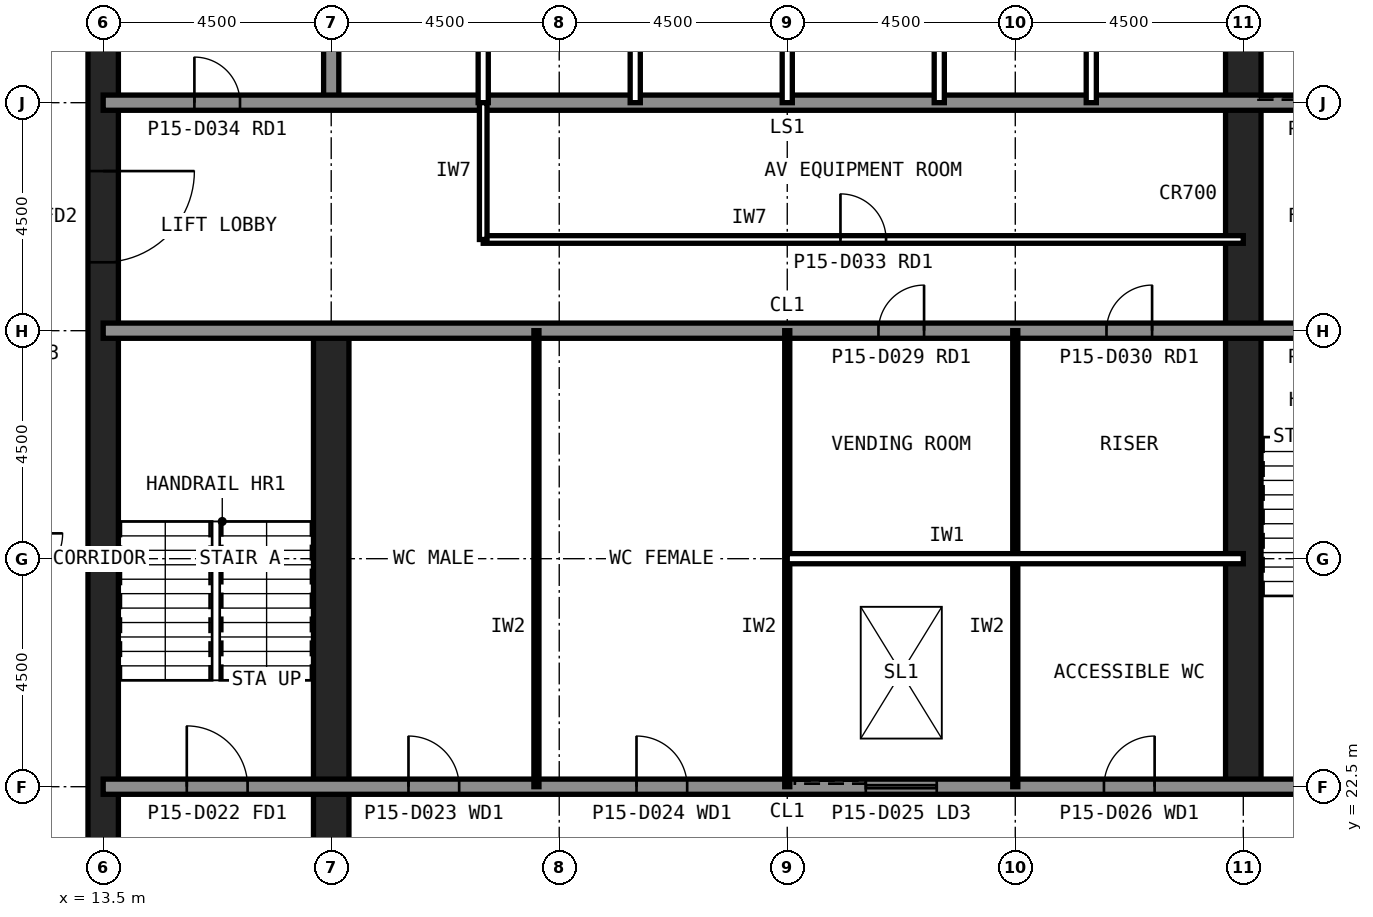
"""IFC4 building model, lengths in metres.
Left out: names, types, materials, properties, quantities, classifications, styles, units other than length and angle.
Written with IfcOpenShell. Run it as: python <this file> out.ifc"""

import sys

from ifc_helpers import new_model, si_unit, direction, frame, frame_2d, origin, place, context, subcontext, project, spatial, rectangle, extrude, element, fill, save


model = new_model("IFC4")
c1 = context("Model", 3, precision=1e-05, world=origin(), true_north=direction((0.0, 1.0)))
c2 = subcontext(c1, "Body", "Model", "MODEL_VIEW")
j1 = project(units=[si_unit("LENGTHUNIT", "METRE"), si_unit("PLANEANGLEUNIT", "RADIAN")], contexts=[c1])
p1 = place(None, origin())
s1 = spatial("IfcSite", under=j1, at=p1, CompositionType="ELEMENT")
p2 = place(p1, origin())
s2 = spatial("IfcBuilding", under=s1, at=p2, CompositionType="ELEMENT")
p3 = place(p2, frame((0.0, 0.0, 62.6)))
s3 = spatial("IfcBuildingStorey", under=s2, at=p3, CompositionType="ELEMENT", Elevation=62.6)
p4 = place(p3, frame((13.5, 40.5, 0.0), z_axis=(0.0, 0.0, 1.0), x_axis=(0.0, -1.0, 0.0)))
e1 = element("IfcWall", 1, at=p4, inside=s3, PredefinedType="SHEAR", context=c2, shape_type="SweptSolid", body=[
    extrude(rectangle(XDim=27.0, YDim=0.6, at=frame_2d((13.5, 0.0))), origin(), (0.0, 0.0, 1.0), 4.2),
])
p5 = place(p4, frame((19.65, 0.0, 0.0)))
e2 = element("IfcOpeningElement", 2, at=p5, cuts=e1, PredefinedType="OPENING", context=c2, shape_type="SweptSolid", body=[
    extrude(rectangle(XDim=1.2, YDim=2.1, at=frame_2d((0.6, 1.05))), frame((0.0, 0.31, 0.0), z_axis=(0.0, -1.0, 0.0), x_axis=(1.0, 0.0, 0.0)), (0.0, 0.0, 1.0), 0.62),
])
p6 = place(p4, frame((5.85, 0.0, 0.0)))
e3 = element("IfcOpeningElement", 3, at=p6, cuts=e1, PredefinedType="OPENING", context=c2, shape_type="SweptSolid", body=[
    extrude(rectangle(XDim=1.8, YDim=2.1, at=frame_2d((0.9, 1.05))), frame((0.0, 0.31, 0.0), z_axis=(0.0, -1.0, 0.0), x_axis=(1.0, 0.0, 0.0)), (0.0, 0.0, 1.0), 0.62),
])
p7 = place(p3, frame((18.0, 13.5, 0.0), z_axis=(0.0, 0.0, 1.0), x_axis=(0.0, 1.0, 0.0)))
e4 = element("IfcWall", 4, at=p7, inside=s3, PredefinedType="SHEAR", context=c2, shape_type="SweptSolid", body=[
    extrude(rectangle(XDim=18.0, YDim=0.7, at=frame_2d((9.0, 0.0))), origin(), (0.0, 0.0, 1.0), 4.2),
])
p8 = place(p3, frame((18.0, 36.0, 0.0), z_axis=(0.0, 0.0, 1.0), x_axis=(0.0, 1.0, 0.0)))
e5 = element("IfcWall", 5, at=p8, inside=s3, PredefinedType="SOLIDWALL", context=c2, shape_type="SweptSolid", body=[
    extrude(rectangle(XDim=4.5, YDim=0.3, at=frame_2d((2.25, 0.0))), origin(), (0.0, 0.0, 1.0), 4.04),
])
p9 = place(p3, frame((36.0, 22.5, 0.0), z_axis=(0.0, 0.0, 1.0), x_axis=(0.0, 1.0, 0.0)))
e6 = element("IfcWall", 6, at=p9, inside=s3, PredefinedType="SHEAR", context=c2, shape_type="SweptSolid", body=[
    extrude(rectangle(XDim=18.0, YDim=0.7, at=frame_2d((9.0, 0.0))), origin(), (0.0, 0.0, 1.0), 4.2),
])
p10 = place(p3, frame((13.5, 36.0, 0.0), z_axis=(0.0, 0.0, 1.0), x_axis=(1.0, 0.0, 0.0)))
e7 = element("IfcWall", 7, at=p10, inside=s3, PredefinedType="SOLIDWALL", context=c2, shape_type="SweptSolid", body=[
    extrude(rectangle(XDim=27.0, YDim=0.3, at=frame_2d((13.5, 0.0))), origin(), (0.0, 0.0, 1.0), 4.04),
])
p11 = place(p10, frame((1.8, 0.0, 0.0)))
e8 = element("IfcOpeningElement", 8, at=p11, cuts=e7, PredefinedType="OPENING", context=c2, shape_type="SweptSolid", body=[
    extrude(rectangle(XDim=0.9, YDim=2.1, at=frame_2d((0.45, 1.05))), frame((0.0, 0.16, 0.0), z_axis=(0.0, -1.0, 0.0), x_axis=(1.0, 0.0, 0.0)), (0.0, 0.0, 1.0), 0.32),
])
p12 = place(p10, frame((24.1, 0.0, 0.0)))
e9 = element("IfcOpeningElement", 9, at=p12, cuts=e7, PredefinedType="OPENING", context=c2, shape_type="SweptSolid", body=[
    extrude(rectangle(XDim=1.3, YDim=2.2, at=frame_2d((0.65, 1.1))), frame((0.0, 0.16, 0.0), z_axis=(0.0, -1.0, 0.0), x_axis=(1.0, 0.0, 0.0)), (0.0, 0.0, 1.0), 0.32),
])
p13 = place(p3, frame((13.5, 22.5, 0.0), z_axis=(0.0, 0.0, 1.0), x_axis=(1.0, 0.0, 0.0)))
e10 = element("IfcWall", 10, at=p13, inside=s3, PredefinedType="SOLIDWALL", context=c2, shape_type="SweptSolid", body=[
    extrude(rectangle(XDim=27.0, YDim=0.3, at=frame_2d((13.5, 0.0))), origin(), (0.0, 0.0, 1.0), 4.04),
])
p14 = place(p13, frame((1.65, 0.0, 0.0)))
e11 = element("IfcOpeningElement", 11, at=p14, cuts=e10, PredefinedType="OPENING", context=c2, shape_type="SweptSolid", body=[
    extrude(rectangle(XDim=1.2, YDim=2.1, at=frame_2d((0.6, 1.05))), frame((0.0, 0.16, 0.0), z_axis=(0.0, -1.0, 0.0), x_axis=(1.0, 0.0, 0.0)), (0.0, 0.0, 1.0), 0.32),
])
p15 = place(p13, frame((6.025, 0.0, 0.0)))
e12 = element("IfcOpeningElement", 12, at=p15, cuts=e10, PredefinedType="OPENING", context=c2, shape_type="SweptSolid", body=[
    extrude(rectangle(XDim=1.0, YDim=2.1, at=frame_2d((0.5, 1.05))), frame((0.0, 0.16, 0.0), z_axis=(0.0, -1.0, 0.0), x_axis=(1.0, 0.0, 0.0)), (0.0, 0.0, 1.0), 0.32),
])
p16 = place(p13, frame((10.525, 0.0, 0.0)))
e13 = element("IfcOpeningElement", 13, at=p16, cuts=e10, PredefinedType="OPENING", context=c2, shape_type="SweptSolid", body=[
    extrude(rectangle(XDim=1.0, YDim=2.1, at=frame_2d((0.5, 1.05))), frame((0.0, 0.16, 0.0), z_axis=(0.0, -1.0, 0.0), x_axis=(1.0, 0.0, 0.0)), (0.0, 0.0, 1.0), 0.32),
])
p17 = place(p13, frame((19.75, 0.0, 0.0)))
e14 = element("IfcOpeningElement", 14, at=p17, cuts=e10, PredefinedType="OPENING", context=c2, shape_type="SweptSolid", body=[
    extrude(rectangle(XDim=1.0, YDim=2.1, at=frame_2d((0.5, 1.05))), frame((0.0, 0.16, 0.0), z_axis=(0.0, -1.0, 0.0), x_axis=(1.0, 0.0, 0.0)), (0.0, 0.0, 1.0), 0.32),
])
p18 = place(p13, frame((15.05, 0.0, 0.0)))
e15 = element("IfcOpeningElement", 15, at=p18, cuts=e10, PredefinedType="OPENING", context=c2, shape_type="SweptSolid", body=[
    extrude(rectangle(XDim=1.4, YDim=2.4, at=frame_2d((0.7, 1.2))), frame((0.0, 0.16, 0.0), z_axis=(0.0, -1.0, 0.0), x_axis=(1.0, 0.0, 0.0)), (0.0, 0.0, 1.0), 0.32),
])
p19 = place(p3, frame((13.5, 31.5, 0.0), z_axis=(0.0, 0.0, 1.0), x_axis=(1.0, 0.0, 0.0)))
e16 = element("IfcWall", 16, at=p19, inside=s3, PredefinedType="SOLIDWALL", context=c2, shape_type="SweptSolid", body=[
    extrude(rectangle(XDim=27.0, YDim=0.3, at=frame_2d((13.5, 0.0))), origin(), (0.0, 0.0, 1.0), 4.04),
])
p20 = place(p19, frame((24.15, 0.0, 0.0)))
e17 = element("IfcOpeningElement", 17, at=p20, cuts=e16, PredefinedType="OPENING", context=c2, shape_type="SweptSolid", body=[
    extrude(rectangle(XDim=1.2, YDim=2.1, at=frame_2d((0.6, 1.05))), frame((0.0, 0.16, 0.0), z_axis=(0.0, -1.0, 0.0), x_axis=(1.0, 0.0, 0.0)), (0.0, 0.0, 1.0), 0.32),
])
p21 = place(p19, frame((15.3, 0.0, 0.0)))
e18 = element("IfcOpeningElement", 18, at=p21, cuts=e16, PredefinedType="OPENING", context=c2, shape_type="SweptSolid", body=[
    extrude(rectangle(XDim=0.9, YDim=2.1, at=frame_2d((0.45, 1.05))), frame((0.0, 0.16, 0.0), z_axis=(0.0, -1.0, 0.0), x_axis=(1.0, 0.0, 0.0)), (0.0, 0.0, 1.0), 0.32),
])
p22 = place(p19, frame((19.8, 0.0, 0.0)))
e19 = element("IfcOpeningElement", 19, at=p22, cuts=e16, PredefinedType="OPENING", context=c2, shape_type="SweptSolid", body=[
    extrude(rectangle(XDim=0.9, YDim=2.1, at=frame_2d((0.45, 1.05))), frame((0.0, 0.16, 0.0), z_axis=(0.0, -1.0, 0.0), x_axis=(1.0, 0.0, 0.0)), (0.0, 0.0, 1.0), 0.32),
])
for number, where, z_axis, x_axis in (
    (20, (21.0, 36.0, 0.0), (0.0, 0.0, 1.0), (0.0, 1.0, 0.0)),
    (21, (24.0, 36.0, 0.0), (0.0, 0.0, 1.0), (0.0, 1.0, 0.0)),
    (22, (27.0, 36.0, 0.0), (0.0, 0.0, 1.0), (0.0, 1.0, 0.0)),
    (23, (30.0, 36.0, 0.0), (0.0, 0.0, 1.0), (0.0, 1.0, 0.0)),
    (24, (33.0, 36.0, 0.0), (0.0, 0.0, 1.0), (0.0, 1.0, 0.0)),
):
    element("IfcWall", number, at=place(p3, frame(where, z_axis=z_axis, x_axis=x_axis)), inside=s3, PredefinedType="PARTITIONING", context=c2, shape_type="SweptSolid", body=[
        extrude(rectangle(XDim=4.5, YDim=0.2, at=frame_2d((2.25, 0.0))), origin(), (0.0, 0.0, 1.0), 4.04),
    ])
for number, where, z_axis, x_axis in (
    (25, (22.05, 22.5, 0.0), (0.0, 0.0, 1.0), (0.0, 1.0, 0.0)),
    (26, (27.0, 22.5, 0.0), (0.0, 0.0, 1.0), (0.0, 1.0, 0.0)),
    (27, (31.5, 22.5, 0.0), (0.0, 0.0, 1.0), (0.0, 1.0, 0.0)),
):
    element("IfcWall", number, at=place(p3, frame(where, z_axis=z_axis, x_axis=x_axis)), inside=s3, PredefinedType="PLUMBINGWALL", context=c2, shape_type="SweptSolid", body=[
        extrude(rectangle(XDim=9.0, YDim=0.1, at=frame_2d((4.5, 0.0))), origin(), (0.0, 0.0, 1.0), 4.04),
    ])
p23 = place(p3, frame((27.0, 27.0, 0.0), z_axis=(0.0, 0.0, 1.0), x_axis=(1.0, 0.0, 0.0)))
e28 = element("IfcWall", 28, at=p23, inside=s3, PredefinedType="PARTITIONING", context=c2, shape_type="SweptSolid", body=[
    extrude(rectangle(XDim=9.0, YDim=0.2, at=frame_2d((4.5, 0.0))), origin(), (0.0, 0.0, 1.0), 4.04),
])
p24 = place(p3, frame((18.0, 33.3, 0.0), z_axis=(0.0, 0.0, 1.0), x_axis=(1.0, 0.0, 0.0)))
e29 = element("IfcWall", 29, at=p24, inside=s3, PredefinedType="PARTITIONING", context=c2, shape_type="SweptSolid", body=[
    extrude(rectangle(XDim=12.0, YDim=0.15, at=frame_2d((6.0, 0.0))), origin(), (0.0, 0.0, 1.0), 4.04),
])
p25 = place(p24, frame((2.55, 0.0, 0.0)))
e30 = element("IfcOpeningElement", 30, at=p25, cuts=e29, PredefinedType="OPENING", context=c2, shape_type="SweptSolid", body=[
    extrude(rectangle(XDim=0.9, YDim=2.1, at=frame_2d((0.45, 1.05))), frame((0.0, 0.085, 0.0), z_axis=(0.0, -1.0, 0.0), x_axis=(1.0, 0.0, 0.0)), (0.0, 0.0, 1.0), 0.17),
])
p26 = place(p24, frame((8.55, 0.0, 0.0)))
e31 = element("IfcOpeningElement", 31, at=p26, cuts=e29, PredefinedType="OPENING", context=c2, shape_type="SweptSolid", body=[
    extrude(rectangle(XDim=0.9, YDim=2.1, at=frame_2d((0.45, 1.05))), frame((0.0, 0.085, 0.0), z_axis=(0.0, -1.0, 0.0), x_axis=(1.0, 0.0, 0.0)), (0.0, 0.0, 1.0), 0.17),
])
for number, where, z_axis, x_axis in (
    (32, (18.0, 33.3, 0.0), (0.0, 0.0, 1.0), (0.0, 1.0, 0.0)),
    (33, (24.0, 33.3, 0.0), (0.0, 0.0, 1.0), (0.0, 1.0, 0.0)),
    (34, (30.0, 33.3, 0.0), (0.0, 0.0, 1.0), (0.0, 1.0, 0.0)),
):
    element("IfcWall", number, at=place(p3, frame(where, z_axis=z_axis, x_axis=x_axis)), inside=s3, PredefinedType="PARTITIONING", context=c2, shape_type="SweptSolid", body=[
        extrude(rectangle(XDim=2.7, YDim=0.15, at=frame_2d((1.35, 0.0))), origin(), (0.0, 0.0, 1.0), 4.04),
    ])
p27 = place(p6, origin())
e35 = element("IfcDoor", 35, at=p27, inside=s3, OperationType="SINGLE_SWING_LEFT", PredefinedType="DOOR", context=c2, shape_type="SweptSolid", body=[
    extrude(rectangle(XDim=1.8, YDim=2.1, at=frame_2d((0.9, 1.05))), frame((0.0, 0.025, 0.0), z_axis=(0.0, -1.0, 0.0), x_axis=(1.0, 0.0, 0.0)), (0.0, 0.0, 1.0), 0.05),
])
fill(e3, e35)
p28 = place(p14, origin())
e36 = element("IfcDoor", 36, at=p28, inside=s3, OperationType="SINGLE_SWING_LEFT", PredefinedType="DOOR", context=c2, shape_type="SweptSolid", body=[
    extrude(rectangle(XDim=1.2, YDim=2.1, at=frame_2d((0.6, 1.05))), frame((0.0, 0.025, 0.0), z_axis=(0.0, -1.0, 0.0), x_axis=(1.0, 0.0, 0.0)), (0.0, 0.0, 1.0), 0.05),
])
fill(e11, e36)
p29 = place(p15, origin())
e37 = element("IfcDoor", 37, at=p29, inside=s3, OperationType="SINGLE_SWING_LEFT", PredefinedType="DOOR", context=c2, shape_type="SweptSolid", body=[
    extrude(rectangle(XDim=1.0, YDim=2.1, at=frame_2d((0.5, 1.05))), frame((0.0, 0.025, 0.0), z_axis=(0.0, -1.0, 0.0), x_axis=(1.0, 0.0, 0.0)), (0.0, 0.0, 1.0), 0.05),
])
fill(e12, e37)
p30 = place(p16, origin())
e38 = element("IfcDoor", 38, at=p30, inside=s3, OperationType="SINGLE_SWING_LEFT", PredefinedType="DOOR", context=c2, shape_type="SweptSolid", body=[
    extrude(rectangle(XDim=1.0, YDim=2.1, at=frame_2d((0.5, 1.05))), frame((0.0, 0.025, 0.0), z_axis=(0.0, -1.0, 0.0), x_axis=(1.0, 0.0, 0.0)), (0.0, 0.0, 1.0), 0.05),
])
fill(e13, e38)
p31 = place(p17, origin())
e39 = element("IfcDoor", 39, at=p31, inside=s3, OperationType="SINGLE_SWING_RIGHT", PredefinedType="DOOR", context=c2, shape_type="SweptSolid", body=[
    extrude(rectangle(XDim=1.0, YDim=2.1, at=frame_2d((0.5, 1.05))), frame((0.0, 0.025, 0.0), z_axis=(0.0, -1.0, 0.0), x_axis=(1.0, 0.0, 0.0)), (0.0, 0.0, 1.0), 0.05),
])
fill(e14, e39)
p32 = place(p21, origin())
e40 = element("IfcDoor", 40, at=p32, inside=s3, OperationType="SINGLE_SWING_RIGHT", PredefinedType="DOOR", context=c2, shape_type="SweptSolid", body=[
    extrude(rectangle(XDim=0.9, YDim=2.1, at=frame_2d((0.45, 1.05))), frame((0.0, 0.025, 0.0), z_axis=(0.0, -1.0, 0.0), x_axis=(1.0, 0.0, 0.0)), (0.0, 0.0, 1.0), 0.05),
])
fill(e18, e40)
p33 = place(p22, origin())
e41 = element("IfcDoor", 41, at=p33, inside=s3, OperationType="SINGLE_SWING_RIGHT", PredefinedType="DOOR", context=c2, shape_type="SweptSolid", body=[
    extrude(rectangle(XDim=0.9, YDim=2.1, at=frame_2d((0.45, 1.05))), frame((0.0, 0.025, 0.0), z_axis=(0.0, -1.0, 0.0), x_axis=(1.0, 0.0, 0.0)), (0.0, 0.0, 1.0), 0.05),
])
fill(e19, e41)
p34 = place(p11, origin())
e42 = element("IfcDoor", 42, at=p34, inside=s3, OperationType="SINGLE_SWING_LEFT", PredefinedType="DOOR", context=c2, shape_type="SweptSolid", body=[
    extrude(rectangle(XDim=0.9, YDim=2.1, at=frame_2d((0.45, 1.05))), frame((0.0, 0.025, 0.0), z_axis=(0.0, -1.0, 0.0), x_axis=(1.0, 0.0, 0.0)), (0.0, 0.0, 1.0), 0.05),
])
fill(e8, e42)
p35 = place(p25, origin())
e43 = element("IfcDoor", 43, at=p35, inside=s3, OperationType="SINGLE_SWING_LEFT", PredefinedType="DOOR", context=c2, shape_type="SweptSolid", body=[
    extrude(rectangle(XDim=0.9, YDim=2.1, at=frame_2d((0.45, 1.05))), frame((0.0, 0.025, 0.0), z_axis=(0.0, -1.0, 0.0), x_axis=(1.0, 0.0, 0.0)), (0.0, 0.0, 1.0), 0.05),
])
fill(e30, e43)
p36 = place(p26, origin())
e44 = element("IfcDoor", 44, at=p36, inside=s3, OperationType="SINGLE_SWING_RIGHT", PredefinedType="DOOR", context=c2, shape_type="SweptSolid", body=[
    extrude(rectangle(XDim=0.9, YDim=2.1, at=frame_2d((0.45, 1.05))), frame((0.0, 0.025, 0.0), z_axis=(0.0, -1.0, 0.0), x_axis=(1.0, 0.0, 0.0)), (0.0, 0.0, 1.0), 0.05),
])
fill(e31, e44)
p37 = place(p18, origin())
e45 = element("IfcDoor", 45, at=p37, inside=s3, OperationType="SLIDING_TO_LEFT", PredefinedType="DOOR", context=c2, shape_type="SweptSolid", body=[
    extrude(rectangle(XDim=1.4, YDim=2.4, at=frame_2d((0.7, 1.2))), frame((0.0, 0.025, 0.0), z_axis=(0.0, -1.0, 0.0), x_axis=(1.0, 0.0, 0.0)), (0.0, 0.0, 1.0), 0.05),
])
fill(e15, e45)
save(model, sys.argv[1])
